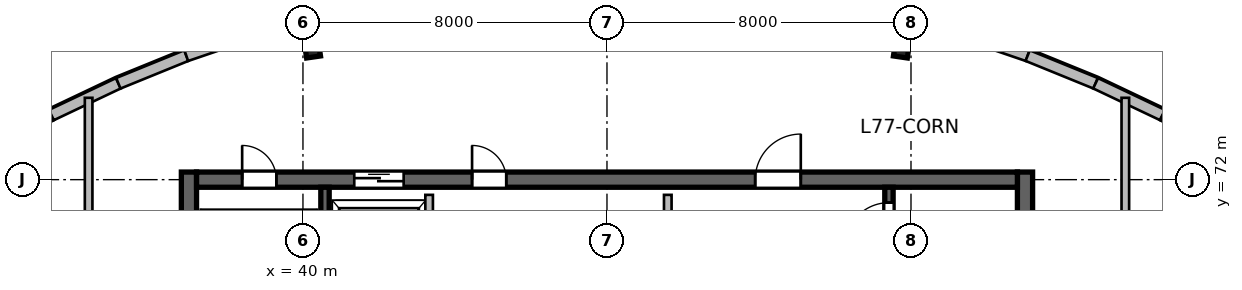
"""IFC4 building model, lengths in metres.
Left out: names, types, materials, properties, quantities, classifications, styles, units other than length and angle.
Written with IfcOpenShell. Run it as: python <this file> out.ifc"""

import sys

from ifc_helpers import new_model, si_unit, direction, frame, frame_2d, origin, origin_2d, place, context, subcontext, project, spatial, rectangle, i_section, extrude, source, transform, mapped, element, fill, save


model = new_model("IFC4")
c1 = context("Model", 3, precision=1e-05, world=origin(), true_north=direction((0.0, 1.0)))
c2 = subcontext(c1, "Body", "Model", "MODEL_VIEW")
j1 = project(units=[si_unit("LENGTHUNIT", "METRE"), si_unit("PLANEANGLEUNIT", "RADIAN")], contexts=[c1])
p1 = place(None, origin())
s1 = spatial("IfcSite", under=j1, at=p1, CompositionType="ELEMENT")
p2 = place(p1, origin())
s2 = spatial("IfcBuilding", under=s1, at=p2, CompositionType="ELEMENT")
p3 = place(p2, frame((0.0, 0.0, 318.0)))
s3 = spatial("IfcBuildingStorey", under=s2, at=p3, CompositionType="ELEMENT", Elevation=318.0)
m1 = source(origin(), c2, "Body", "SweptSolid", [
    extrude(rectangle(XDim=12.0, YDim=0.4, at=frame_2d((6.0, 0.0))), origin(), (0.0, 0.0, 1.0), 5.4),
])
for number, where, z_axis, x_axis in (
    (1, (37.0, 60.2, 0.0), (0.0, 0.0, 1.0), (0.0, 1.0, 0.0)),
    (2, (59.0, 60.2, 0.0), (0.0, 0.0, 1.0), (0.0, 1.0, 0.0)),
):
    element("IfcWall", number, at=place(p3, frame(where, z_axis=z_axis, x_axis=x_axis)), inside=s3, PredefinedType="SHEAR", context=c2, shape_type="MappedRepresentation", body=[
        mapped(m1, transform((0.0, 0.0, 0.0), scale=1.0)),
    ])
m2 = source(origin(), c2, "Body", "SweptSolid", [
    extrude(rectangle(XDim=21.6, YDim=0.4, at=frame_2d((10.8, 0.0))), origin(), (0.0, 0.0, 1.0), 5.4),
])
p4 = place(p3, frame((37.2, 72.0, 0.0), z_axis=(0.0, 0.0, 1.0), x_axis=(1.0, 0.0, 0.0)))
e3 = element("IfcWall", 3, at=p4, inside=s3, PredefinedType="SHEAR", context=c2, shape_type="MappedRepresentation", body=[
    mapped(m2, transform((0.0, 0.0, 0.0), scale=1.0)),
])
p5 = place(p4, frame((1.2, 0.0, 0.0)))
e4 = element("IfcOpeningElement", 4, at=p5, cuts=e3, PredefinedType="OPENING", context=c2, shape_type="SweptSolid", body=[
    extrude(rectangle(XDim=0.9, YDim=2.1, at=frame_2d((0.45, 1.05))), frame((0.0, 0.21, 0.0), z_axis=(0.0, -1.0, 0.0), x_axis=(1.0, 0.0, 0.0)), (0.0, 0.0, 1.0), 0.42),
])
p6 = place(p4, frame((14.7, 0.0, 0.0)))
e5 = element("IfcOpeningElement", 5, at=p6, cuts=e3, PredefinedType="OPENING", context=c2, shape_type="SweptSolid", body=[
    extrude(rectangle(XDim=1.2, YDim=2.15, at=frame_2d((0.6, 1.075))), frame((0.0, 0.21, 0.0), z_axis=(0.0, -1.0, 0.0), x_axis=(1.0, 0.0, 0.0)), (0.0, 0.0, 1.0), 0.42),
])
p7 = place(p4, frame((4.15, 0.0, 0.0)))
e6 = element("IfcOpeningElement", 6, at=p7, cuts=e3, PredefinedType="OPENING", context=c2, shape_type="SweptSolid", body=[
    extrude(rectangle(XDim=1.3, YDim=2.15, at=frame_2d((0.65, 1.075))), frame((0.0, 0.21, 0.0), z_axis=(0.0, -1.0, 0.0), x_axis=(1.0, 0.0, 0.0)), (0.0, 0.0, 1.0), 0.42),
])
p8 = place(p4, frame((7.25, 0.0, 0.0)))
e7 = element("IfcOpeningElement", 7, at=p8, cuts=e3, PredefinedType="OPENING", context=c2, shape_type="SweptSolid", body=[
    extrude(rectangle(XDim=0.9, YDim=2.1, at=frame_2d((0.45, 1.05))), frame((0.0, 0.21, 0.0), z_axis=(0.0, -1.0, 0.0), x_axis=(1.0, 0.0, 0.0)), (0.0, 0.0, 1.0), 0.42),
])
m3 = source(origin(), c2, "Body", "SweptSolid", [
    extrude(rectangle(XDim=11.2, YDim=0.22, at=frame_2d((5.6, 0.0))), origin(), (0.0, 0.0, 1.0), 5.4),
])
p9 = place(p3, frame((40.58, 60.6, 0.0), z_axis=(0.0, 0.0, 1.0), x_axis=(0.0, 1.0, 0.0)))
e8 = element("IfcWall", 8, at=p9, inside=s3, PredefinedType="SHEAR", context=c2, shape_type="MappedRepresentation", body=[
    mapped(m3, transform((0.0, 0.0, 0.0), scale=1.0)),
])
p10 = place(p3, frame((55.42, 60.6, 0.0), z_axis=(0.0, 0.0, 1.0), x_axis=(0.0, 1.0, 0.0)))
e9 = element("IfcWall", 9, at=p10, inside=s3, PredefinedType="SHEAR", context=c2, shape_type="MappedRepresentation", body=[
    mapped(m3, transform((0.0, 0.0, 0.0), scale=1.0)),
])
p11 = place(p10, frame((9.645, 0.0, 0.0)))
e10 = element("IfcOpeningElement", 10, at=p11, cuts=e9, PredefinedType="OPENING", context=c2, shape_type="SweptSolid", body=[
    extrude(rectangle(XDim=1.15, YDim=2.15, at=frame_2d((0.575, 1.075))), frame((0.0, 0.12, 0.0), z_axis=(0.0, -1.0, 0.0), x_axis=(1.0, 0.0, 0.0)), (0.0, 0.0, 1.0), 0.24),
])
m4 = source(origin(), c2, "Body", "SweptSolid", [
    extrude(i_section(OverallWidth=0.369, OverallDepth=0.356, WebThickness=0.011, FlangeThickness=0.018, at=origin_2d()), origin(), (0.0, 0.0, 1.0), 5.4),
])
for number, where, z_axis, x_axis in (
    (11, (40.253, 75.404, 0.0), (0.0, 0.0, 1.0), (-0.143, 0.99, 0.0)),
    (12, (55.747, 75.404, 0.0), (0.0, 0.0, 1.0), (0.143, 0.99, 0.0)),
):
    element("IfcColumn", number, at=place(p3, frame(where, z_axis=z_axis, x_axis=x_axis)), inside=s3, PredefinedType="COLUMN", context=c2, shape_type="MappedRepresentation", body=[
        mapped(m4, transform((0.0, 0.0, 0.0), scale=1.0)),
    ])
m5 = source(origin(), c2, "Body", "SweptSolid", [
    extrude(rectangle(XDim=1.972, YDim=0.3, at=frame_2d((0.986, 0.0))), origin(), (0.0, 0.0, 1.0), 5.12),
])
p12 = place(p3, frame((31.648, 72.758, 0.0), z_axis=(0.0, 0.0, 1.0), x_axis=(0.878387239208, 0.477949639603, 0.0)))
e13 = element("IfcWall", 13, at=p12, inside=s3, PredefinedType="SOLIDWALL", context=c2, shape_type="MappedRepresentation", body=[
    mapped(m5, transform((0.0, 0.0, 0.0), scale=1.0)),
])
m6 = source(origin(), c2, "Body", "SweptSolid", [
    extrude(rectangle(XDim=1.95, YDim=0.3, at=frame_2d((0.975, 0.0))), origin(), (0.0, 0.0, 1.0), 5.12),
])
p13 = place(p3, frame((33.38, 73.7, 0.0), z_axis=(0.0, 0.0, 1.0), x_axis=(0.903429098402, 0.428737523621, 0.0)))
e14 = element("IfcWall", 14, at=p13, inside=s3, PredefinedType="SOLIDWALL", context=c2, shape_type="MappedRepresentation", body=[
    mapped(m6, transform((0.0, 0.0, 0.0), scale=1.0)),
])
m7 = source(origin(), c2, "Body", "SweptSolid", [
    extrude(rectangle(XDim=1.93, YDim=0.3, at=frame_2d((0.965, 0.0))), origin(), (0.0, 0.0, 1.0), 5.12),
])
p14 = place(p3, frame((35.142, 74.536, 0.0), z_axis=(0.0, 0.0, 1.0), x_axis=(0.926200349129, 0.377031713882, 0.0)))
e15 = element("IfcWall", 15, at=p14, inside=s3, PredefinedType="SOLIDWALL", context=c2, shape_type="MappedRepresentation", body=[
    mapped(m7, transform((0.0, 0.0, 0.0), scale=1.0)),
])
m8 = source(origin(), c2, "Body", "SweptSolid", [
    extrude(rectangle(XDim=1.913, YDim=0.3, at=frame_2d((0.957, 0.0))), origin(), (0.0, 0.0, 1.0), 5.12),
])
for number, where, z_axis, x_axis in (
    (16, (36.93, 75.264, 0.0), (0.0, 0.0, 1.0), (0.946, 0.323, 0.0)),
    (17, (57.26, 75.882, 0.0), (0.0, 0.0, 1.0), (0.946, -0.323, 0.0)),
):
    element("IfcWall", number, at=place(p3, frame(where, z_axis=z_axis, x_axis=x_axis)), inside=s3, PredefinedType="SOLIDWALL", context=c2, shape_type="MappedRepresentation", body=[
        mapped(m8, transform((0.0, 0.0, 0.0), scale=1.0)),
    ])
p15 = place(p3, frame((59.07, 75.264, 0.0), z_axis=(0.0, 0.0, 1.0), x_axis=(0.926200349129, -0.377031713882, 0.0)))
e18 = element("IfcWall", 18, at=p15, inside=s3, PredefinedType="SOLIDWALL", context=c2, shape_type="MappedRepresentation", body=[
    mapped(m7, transform((0.0, 0.0, 0.0), scale=1.0)),
])
p16 = place(p3, frame((60.858, 74.536, 0.0), z_axis=(0.0, 0.0, 1.0), x_axis=(0.903429098402, -0.428737523621, 0.0)))
e19 = element("IfcWall", 19, at=p16, inside=s3, PredefinedType="SOLIDWALL", context=c2, shape_type="MappedRepresentation", body=[
    mapped(m6, transform((0.0, 0.0, 0.0), scale=1.0)),
])
p17 = place(p3, frame((62.62, 73.7, 0.0), z_axis=(0.0, 0.0, 1.0), x_axis=(0.878387239208, -0.477949639603, 0.0)))
e20 = element("IfcWall", 20, at=p17, inside=s3, PredefinedType="SOLIDWALL", context=c2, shape_type="MappedRepresentation", body=[
    mapped(m5, transform((0.0, 0.0, 0.0), scale=1.0)),
])
m9 = source(origin(), c2, "Body", "SweptSolid", [
    extrude(rectangle(XDim=5.8, YDim=0.2, at=frame_2d((2.9, 0.0))), origin(), (0.0, 0.0, 1.0), 5.12),
])
p18 = place(p3, frame((49.6, 65.8, 0.0), z_axis=(0.0, 0.0, 1.0), x_axis=(0.0, 1.0, 0.0)))
e21 = element("IfcWall", 21, at=p18, inside=s3, PredefinedType="SOLIDWALL", context=c2, shape_type="MappedRepresentation", body=[
    mapped(m9, transform((0.0, 0.0, 0.0), scale=1.0)),
])
m10 = source(origin(), c2, "Body", "SweptSolid", [
    extrude(rectangle(XDim=3.2, YDim=0.2, at=frame_2d((1.6, 0.0))), origin(), (0.0, 0.0, 1.0), 5.12),
])
p19 = place(p3, frame((43.32, 68.4, 0.0), z_axis=(0.0, 0.0, 1.0), x_axis=(0.0, 1.0, 0.0)))
e22 = element("IfcWall", 22, at=p19, inside=s3, PredefinedType="SOLIDWALL", context=c2, shape_type="MappedRepresentation", body=[
    mapped(m10, transform((0.0, 0.0, 0.0), scale=1.0)),
])
m11 = source(origin(), c2, "Body", "SweptSolid", [
    extrude(rectangle(XDim=22.582, YDim=0.2, at=frame_2d((11.291, 0.0))), origin(), (0.0, 0.0, 1.0), 5.12),
])
p20 = place(p3, frame((34.36, 51.572, 0.0), z_axis=(0.0, 0.0, 1.0), x_axis=(0.0, 1.0, 0.0)))
e23 = element("IfcWall", 23, at=p20, inside=s3, PredefinedType="SOLIDWALL", context=c2, shape_type="MappedRepresentation", body=[
    mapped(m11, transform((0.0, 0.0, 0.0), scale=1.0)),
])
p21 = place(p20, frame((10.691, 0.0, 0.0)))
e24 = element("IfcOpeningElement", 24, at=p21, cuts=e23, PredefinedType="OPENING", context=c2, shape_type="SweptSolid", body=[
    extrude(rectangle(XDim=1.2, YDim=2.15, at=frame_2d((0.6, 1.075))), frame((0.0, 0.11, 0.0), z_axis=(0.0, -1.0, 0.0), x_axis=(1.0, 0.0, 0.0)), (0.0, 0.0, 1.0), 0.22),
])
p22 = place(p3, frame((61.64, 51.572, 0.0), z_axis=(0.0, 0.0, 1.0), x_axis=(0.0, 1.0, 0.0)))
e25 = element("IfcWall", 25, at=p22, inside=s3, PredefinedType="SOLIDWALL", context=c2, shape_type="MappedRepresentation", body=[
    mapped(m11, transform((0.0, 0.0, 0.0), scale=1.0)),
])
p23 = place(p22, frame((10.691, 0.0, 0.0)))
e26 = element("IfcOpeningElement", 26, at=p23, cuts=e25, PredefinedType="OPENING", context=c2, shape_type="SweptSolid", body=[
    extrude(rectangle(XDim=1.2, YDim=2.15, at=frame_2d((0.6, 1.075))), frame((0.0, 0.11, 0.0), z_axis=(0.0, -1.0, 0.0), x_axis=(1.0, 0.0, 0.0)), (0.0, 0.0, 1.0), 0.22),
])
m12 = source(origin(), c2, "Body", "SweptSolid", [
    extrude(rectangle(XDim=0.9, YDim=2.1, at=frame_2d((0.45, 1.05))), frame((0.0, 0.025, 0.0), z_axis=(0.0, -1.0, 0.0), x_axis=(1.0, 0.0, 0.0)), (0.0, 0.0, 1.0), 0.05),
])
p24 = place(p5, origin())
e27 = element("IfcDoor", 27, at=p24, inside=s3, OperationType="SINGLE_SWING_LEFT", PredefinedType="DOOR", context=c2, shape_type="MappedRepresentation", body=[
    mapped(m12, transform((0.0, 0.0, 0.0), scale=1.0)),
])
fill(e4, e27)
m13 = source(origin(), c2, "Body", "SweptSolid", [
    extrude(rectangle(XDim=1.15, YDim=2.15, at=frame_2d((0.575, 1.075))), frame((0.0, 0.025, 0.0), z_axis=(0.0, -1.0, 0.0), x_axis=(1.0, 0.0, 0.0)), (0.0, 0.0, 1.0), 0.05),
])
p25 = place(p11, origin())
e28 = element("IfcDoor", 28, at=p25, inside=s3, OperationType="SINGLE_SWING_LEFT", PredefinedType="DOOR", context=c2, shape_type="MappedRepresentation", body=[
    mapped(m13, transform((0.0, 0.0, 0.0), scale=1.0)),
])
fill(e10, e28)
m14 = source(origin(), c2, "Body", "SweptSolid", [
    extrude(rectangle(XDim=1.2, YDim=2.15, at=frame_2d((0.6, 1.075))), frame((0.0, 0.025, 0.0), z_axis=(0.0, -1.0, 0.0), x_axis=(1.0, 0.0, 0.0)), (0.0, 0.0, 1.0), 0.05),
])
p26 = place(p6, origin())
e29 = element("IfcDoor", 29, at=p26, inside=s3, OperationType="SINGLE_SWING_RIGHT", PredefinedType="DOOR", context=c2, shape_type="MappedRepresentation", body=[
    mapped(m14, transform((0.0, 0.0, 0.0), scale=1.0)),
])
fill(e5, e29)
m15 = source(origin(), c2, "Body", "SweptSolid", [
    extrude(rectangle(XDim=1.3, YDim=2.15, at=frame_2d((0.65, 1.075))), frame((0.0, 0.025, 0.0), z_axis=(0.0, -1.0, 0.0), x_axis=(1.0, 0.0, 0.0)), (0.0, 0.0, 1.0), 0.05),
])
p27 = place(p7, origin())
e30 = element("IfcDoor", 30, at=p27, inside=s3, OperationType="DOUBLE_DOOR_SLIDING", PredefinedType="DOOR", context=c2, shape_type="MappedRepresentation", body=[
    mapped(m15, transform((0.0, 0.0, 0.0), scale=1.0)),
])
fill(e6, e30)
p28 = place(p8, origin())
e31 = element("IfcDoor", 31, at=p28, inside=s3, OperationType="SINGLE_SWING_LEFT", PredefinedType="DOOR", context=c2, shape_type="MappedRepresentation", body=[
    mapped(m12, transform((0.0, 0.0, 0.0), scale=1.0)),
])
fill(e7, e31)
save(model, sys.argv[1])
